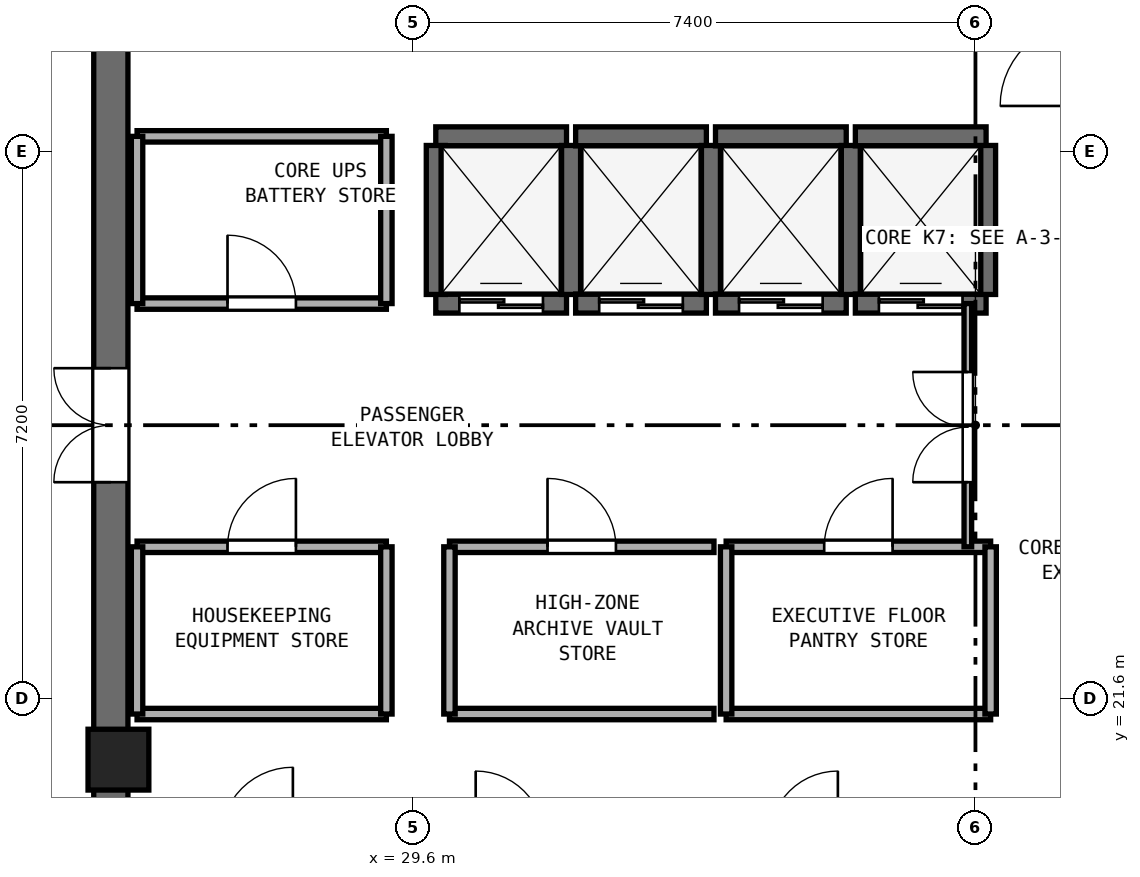
"""IFC4 building model, lengths in metres.
Left out: names, types, materials, properties, quantities, classifications, styles, units other than length and angle.
Written with IfcOpenShell. Run it as: python <this file> out.ifc"""

import sys

from ifc_helpers import new_model, si_unit, direction, frame, frame_2d, origin, origin_2d, place, context, subcontext, project, spatial, rectangle, extrude, element, fill, save


model = new_model("IFC4")
c1 = context("Model", 3, precision=1e-05, world=origin(), true_north=direction((0.0, 1.0)))
c2 = subcontext(c1, "Body", "Model", "MODEL_VIEW")
j1 = project(units=[si_unit("LENGTHUNIT", "METRE"), si_unit("PLANEANGLEUNIT", "RADIAN")], contexts=[c1])
p1 = place(None, origin())
s1 = spatial("IfcSite", under=j1, at=p1, CompositionType="ELEMENT")
p2 = place(p1, origin())
s2 = spatial("IfcBuilding", under=s1, at=p2, CompositionType="ELEMENT")
p3 = place(p2, frame((0.0, 0.0, 270.6)))
s3 = spatial("IfcBuildingStorey", under=s2, at=p3, CompositionType="ELEMENT", Elevation=270.6)
p4 = place(p3, frame((25.625, 17.45, 0.0), z_axis=(0.0, 0.0, 1.0), x_axis=(0.0, 1.0, 0.0)))
e1 = element("IfcWall", 1, at=p4, inside=s3, PredefinedType="SHEAR", context=c2, shape_type="SweptSolid", body=[
    extrude(rectangle(XDim=15.5, YDim=0.45, at=frame_2d((7.75, 0.0))), origin(), (0.0, 0.0, 1.0), 3.54),
])
p5 = place(p4, frame((7.0, 0.0, 0.0)))
e2 = element("IfcOpeningElement", 2, at=p5, cuts=e1, PredefinedType="OPENING", context=c2, shape_type="SweptSolid", body=[
    extrude(rectangle(XDim=1.5, YDim=2.15, at=frame_2d((0.75, 1.075))), frame((0.0, 0.235, 0.0), z_axis=(0.0, -1.0, 0.0), x_axis=(1.0, 0.0, 0.0)), (0.0, 0.0, 1.0), 0.47),
])
p6 = place(p3, frame((25.725, 20.8, 0.0), z_axis=(0.0, 0.0, 1.0), x_axis=(1.0, 0.0, 0.0)))
e3 = element("IfcColumn", 3, at=p6, inside=s3, PredefinedType="PILASTER", context=c2, shape_type="SweptSolid", body=[
    extrude(rectangle(XDim=0.8, YDim=0.8, at=origin_2d()), origin(), (0.0, 0.0, 1.0), 3.8),
])
p7 = place(p3, frame((29.9, 26.8, 0.0), z_axis=(0.0, 0.0, 1.0), x_axis=(1.0, 0.0, 0.0)))
e4 = element("IfcWall", 4, at=p7, inside=s3, PredefinedType="SHEAR", context=c2, shape_type="SweptSolid", body=[
    extrude(rectangle(XDim=1.72, YDim=0.25, at=frame_2d((0.86, 0.0))), origin(), (0.0, 0.0, 1.0), 3.54),
])
p8 = place(p7, frame((0.31, 0.0, 0.0)))
e5 = element("IfcOpeningElement", 5, at=p8, cuts=e4, PredefinedType="OPENING", context=c2, shape_type="SweptSolid", body=[
    extrude(rectangle(XDim=1.1, YDim=2.15, at=frame_2d((0.55, 1.075))), frame((0.0, 0.135, 0.0), z_axis=(0.0, -1.0, 0.0), x_axis=(1.0, 0.0, 0.0)), (0.0, 0.0, 1.0), 0.27),
])
p9 = place(p3, frame((29.9, 29.0, 0.0), z_axis=(0.0, 0.0, 1.0), x_axis=(1.0, 0.0, 0.0)))
e6 = element("IfcWall", 6, at=p9, inside=s3, PredefinedType="SHEAR", context=c2, shape_type="SweptSolid", body=[
    extrude(rectangle(XDim=1.72, YDim=0.25, at=frame_2d((0.86, 0.0))), origin(), (0.0, 0.0, 1.0), 3.54),
])
for number, where, z_axis, x_axis in (
    (7, (29.9, 26.92, 0.0), (0.0, 0.0, 1.0), (0.0, 1.0, 0.0)),
    (8, (31.68, 26.92, 0.0), (0.0, 0.0, 1.0), (0.0, 1.0, 0.0)),
):
    element("IfcWall", number, at=place(p3, frame(where, z_axis=z_axis, x_axis=x_axis)), inside=s3, PredefinedType="SHEAR", context=c2, shape_type="SweptSolid", body=[
        extrude(rectangle(XDim=1.96, YDim=0.25, at=frame_2d((0.98, 0.0))), origin(), (0.0, 0.0, 1.0), 3.54),
    ])
p10 = place(p3, frame((31.74, 26.8, 0.0), z_axis=(0.0, 0.0, 1.0), x_axis=(1.0, 0.0, 0.0)))
e9 = element("IfcWall", 9, at=p10, inside=s3, PredefinedType="SHEAR", context=c2, shape_type="SweptSolid", body=[
    extrude(rectangle(XDim=1.72, YDim=0.25, at=frame_2d((0.86, 0.0))), origin(), (0.0, 0.0, 1.0), 3.54),
])
p11 = place(p10, frame((0.31, 0.0, 0.0)))
e10 = element("IfcOpeningElement", 10, at=p11, cuts=e9, PredefinedType="OPENING", context=c2, shape_type="SweptSolid", body=[
    extrude(rectangle(XDim=1.1, YDim=2.15, at=frame_2d((0.55, 1.075))), frame((0.0, 0.135, 0.0), z_axis=(0.0, -1.0, 0.0), x_axis=(1.0, 0.0, 0.0)), (0.0, 0.0, 1.0), 0.27),
])
p12 = place(p3, frame((31.74, 29.0, 0.0), z_axis=(0.0, 0.0, 1.0), x_axis=(1.0, 0.0, 0.0)))
e11 = element("IfcWall", 11, at=p12, inside=s3, PredefinedType="SHEAR", context=c2, shape_type="SweptSolid", body=[
    extrude(rectangle(XDim=1.72, YDim=0.25, at=frame_2d((0.86, 0.0))), origin(), (0.0, 0.0, 1.0), 3.54),
])
p13 = place(p3, frame((33.52, 26.92, 0.0), z_axis=(0.0, 0.0, 1.0), x_axis=(0.0, 1.0, 0.0)))
e12 = element("IfcWall", 12, at=p13, inside=s3, PredefinedType="SHEAR", context=c2, shape_type="SweptSolid", body=[
    extrude(rectangle(XDim=1.96, YDim=0.25, at=frame_2d((0.98, 0.0))), origin(), (0.0, 0.0, 1.0), 3.54),
])
p14 = place(p3, frame((33.58, 26.8, 0.0), z_axis=(0.0, 0.0, 1.0), x_axis=(1.0, 0.0, 0.0)))
e13 = element("IfcWall", 13, at=p14, inside=s3, PredefinedType="SHEAR", context=c2, shape_type="SweptSolid", body=[
    extrude(rectangle(XDim=1.72, YDim=0.25, at=frame_2d((0.86, 0.0))), origin(), (0.0, 0.0, 1.0), 3.54),
])
p15 = place(p14, frame((0.31, 0.0, 0.0)))
e14 = element("IfcOpeningElement", 14, at=p15, cuts=e13, PredefinedType="OPENING", context=c2, shape_type="SweptSolid", body=[
    extrude(rectangle(XDim=1.1, YDim=2.15, at=frame_2d((0.55, 1.075))), frame((0.0, 0.135, 0.0), z_axis=(0.0, -1.0, 0.0), x_axis=(1.0, 0.0, 0.0)), (0.0, 0.0, 1.0), 0.27),
])
p16 = place(p3, frame((33.58, 29.0, 0.0), z_axis=(0.0, 0.0, 1.0), x_axis=(1.0, 0.0, 0.0)))
e15 = element("IfcWall", 15, at=p16, inside=s3, PredefinedType="SHEAR", context=c2, shape_type="SweptSolid", body=[
    extrude(rectangle(XDim=1.72, YDim=0.25, at=frame_2d((0.86, 0.0))), origin(), (0.0, 0.0, 1.0), 3.54),
])
p17 = place(p3, frame((35.36, 26.92, 0.0), z_axis=(0.0, 0.0, 1.0), x_axis=(0.0, 1.0, 0.0)))
e16 = element("IfcWall", 16, at=p17, inside=s3, PredefinedType="SHEAR", context=c2, shape_type="SweptSolid", body=[
    extrude(rectangle(XDim=1.96, YDim=0.25, at=frame_2d((0.98, 0.0))), origin(), (0.0, 0.0, 1.0), 3.54),
])
p18 = place(p3, frame((35.42, 26.8, 0.0), z_axis=(0.0, 0.0, 1.0), x_axis=(1.0, 0.0, 0.0)))
e17 = element("IfcWall", 17, at=p18, inside=s3, PredefinedType="SHEAR", context=c2, shape_type="SweptSolid", body=[
    extrude(rectangle(XDim=1.72, YDim=0.25, at=frame_2d((0.86, 0.0))), origin(), (0.0, 0.0, 1.0), 3.54),
])
p19 = place(p18, frame((0.31, 0.0, 0.0)))
e18 = element("IfcOpeningElement", 18, at=p19, cuts=e17, PredefinedType="OPENING", context=c2, shape_type="SweptSolid", body=[
    extrude(rectangle(XDim=1.1, YDim=2.15, at=frame_2d((0.55, 1.075))), frame((0.0, 0.135, 0.0), z_axis=(0.0, -1.0, 0.0), x_axis=(1.0, 0.0, 0.0)), (0.0, 0.0, 1.0), 0.27),
])
p20 = place(p3, frame((35.42, 29.0, 0.0), z_axis=(0.0, 0.0, 1.0), x_axis=(1.0, 0.0, 0.0)))
e19 = element("IfcWall", 19, at=p20, inside=s3, PredefinedType="SHEAR", context=c2, shape_type="SweptSolid", body=[
    extrude(rectangle(XDim=1.72, YDim=0.25, at=frame_2d((0.86, 0.0))), origin(), (0.0, 0.0, 1.0), 3.54),
])
p21 = place(p3, frame((37.14, 26.92, 0.0), z_axis=(0.0, 0.0, 1.0), x_axis=(0.0, 1.0, 0.0)))
e20 = element("IfcWall", 20, at=p21, inside=s3, PredefinedType="SHEAR", context=c2, shape_type="SweptSolid", body=[
    extrude(rectangle(XDim=1.96, YDim=0.25, at=frame_2d((0.98, 0.0))), origin(), (0.0, 0.0, 1.0), 3.54),
])
p22 = place(p3, frame((25.97, 26.8, 0.0), z_axis=(0.0, 0.0, 1.0), x_axis=(1.0, 0.0, 0.0)))
e21 = element("IfcWall", 21, at=p22, inside=s3, PredefinedType="PARTITIONING", context=c2, shape_type="SweptSolid", body=[
    extrude(rectangle(XDim=3.28, YDim=0.15, at=frame_2d((1.64, 0.0))), origin(), (0.0, 0.0, 1.0), 3.54),
])
p23 = place(p22, frame((1.19, 0.0, 0.0)))
e22 = element("IfcOpeningElement", 22, at=p23, cuts=e21, PredefinedType="OPENING", context=c2, shape_type="SweptSolid", body=[
    extrude(rectangle(XDim=0.9, YDim=2.1, at=frame_2d((0.45, 1.05))), frame((0.0, 0.085, 0.0), z_axis=(0.0, -1.0, 0.0), x_axis=(1.0, 0.0, 0.0)), (0.0, 0.0, 1.0), 0.17),
])
p24 = place(p3, frame((25.97, 29.0, 0.0), z_axis=(0.0, 0.0, 1.0), x_axis=(1.0, 0.0, 0.0)))
e23 = element("IfcWall", 23, at=p24, inside=s3, PredefinedType="PARTITIONING", context=c2, shape_type="SweptSolid", body=[
    extrude(rectangle(XDim=3.28, YDim=0.15, at=frame_2d((1.64, 0.0))), origin(), (0.0, 0.0, 1.0), 3.54),
])
p25 = place(p3, frame((25.97, 26.8, 0.0), z_axis=(0.0, 0.0, 1.0), x_axis=(0.0, 1.0, 0.0)))
e24 = element("IfcWall", 24, at=p25, inside=s3, PredefinedType="PARTITIONING", context=c2, shape_type="SweptSolid", body=[
    extrude(rectangle(XDim=2.2, YDim=0.15, at=frame_2d((1.1, 0.0))), origin(), (0.0, 0.0, 1.0), 2.64),
])
p26 = place(p3, frame((29.25, 26.8, 0.0), z_axis=(0.0, 0.0, 1.0), x_axis=(0.0, 1.0, 0.0)))
e25 = element("IfcWall", 25, at=p26, inside=s3, PredefinedType="PARTITIONING", context=c2, shape_type="SweptSolid", body=[
    extrude(rectangle(XDim=2.2, YDim=0.15, at=frame_2d((1.1, 0.0))), origin(), (0.0, 0.0, 1.0), 3.54),
])
p27 = place(p3, frame((25.97, 21.4, 0.0), z_axis=(0.0, 0.0, 1.0), x_axis=(1.0, 0.0, 0.0)))
e26 = element("IfcWall", 26, at=p27, inside=s3, PredefinedType="PARTITIONING", context=c2, shape_type="SweptSolid", body=[
    extrude(rectangle(XDim=3.28, YDim=0.15, at=frame_2d((1.64, 0.0))), origin(), (0.0, 0.0, 1.0), 3.54),
])
p28 = place(p3, frame((25.97, 23.6, 0.0), z_axis=(0.0, 0.0, 1.0), x_axis=(1.0, 0.0, 0.0)))
e27 = element("IfcWall", 27, at=p28, inside=s3, PredefinedType="PARTITIONING", context=c2, shape_type="SweptSolid", body=[
    extrude(rectangle(XDim=3.28, YDim=0.15, at=frame_2d((1.64, 0.0))), origin(), (0.0, 0.0, 1.0), 3.54),
])
p29 = place(p28, frame((1.19, 0.0, 0.0)))
e28 = element("IfcOpeningElement", 28, at=p29, cuts=e27, PredefinedType="OPENING", context=c2, shape_type="SweptSolid", body=[
    extrude(rectangle(XDim=0.9, YDim=2.1, at=frame_2d((0.45, 1.05))), frame((0.0, 0.085, 0.0), z_axis=(0.0, -1.0, 0.0), x_axis=(1.0, 0.0, 0.0)), (0.0, 0.0, 1.0), 0.17),
])
p30 = place(p3, frame((25.97, 21.4, 0.0), z_axis=(0.0, 0.0, 1.0), x_axis=(0.0, 1.0, 0.0)))
e29 = element("IfcWall", 29, at=p30, inside=s3, PredefinedType="PARTITIONING", context=c2, shape_type="SweptSolid", body=[
    extrude(rectangle(XDim=2.2, YDim=0.15, at=frame_2d((1.1, 0.0))), origin(), (0.0, 0.0, 1.0), 2.64),
])
p31 = place(p3, frame((29.25, 21.4, 0.0), z_axis=(0.0, 0.0, 1.0), x_axis=(0.0, 1.0, 0.0)))
e30 = element("IfcWall", 30, at=p31, inside=s3, PredefinedType="PARTITIONING", context=c2, shape_type="SweptSolid", body=[
    extrude(rectangle(XDim=2.2, YDim=0.15, at=frame_2d((1.1, 0.0))), origin(), (0.0, 0.0, 1.0), 3.54),
])
p32 = place(p3, frame((30.08, 21.4, 0.0), z_axis=(0.0, 0.0, 1.0), x_axis=(1.0, 0.0, 0.0)))
e31 = element("IfcWall", 31, at=p32, inside=s3, PredefinedType="PARTITIONING", context=c2, shape_type="SweptSolid", body=[
    extrude(rectangle(XDim=3.48, YDim=0.15, at=frame_2d((1.74, 0.0))), origin(), (0.0, 0.0, 1.0), 3.54),
])
p33 = place(p3, frame((30.08, 23.6, 0.0), z_axis=(0.0, 0.0, 1.0), x_axis=(1.0, 0.0, 0.0)))
e32 = element("IfcWall", 32, at=p33, inside=s3, PredefinedType="PARTITIONING", context=c2, shape_type="SweptSolid", body=[
    extrude(rectangle(XDim=3.48, YDim=0.15, at=frame_2d((1.74, 0.0))), origin(), (0.0, 0.0, 1.0), 3.54),
])
p34 = place(p33, frame((1.29, 0.0, 0.0)))
e33 = element("IfcOpeningElement", 33, at=p34, cuts=e32, PredefinedType="OPENING", context=c2, shape_type="SweptSolid", body=[
    extrude(rectangle(XDim=0.9, YDim=2.1, at=frame_2d((0.45, 1.05))), frame((0.0, 0.085, 0.0), z_axis=(0.0, -1.0, 0.0), x_axis=(1.0, 0.0, 0.0)), (0.0, 0.0, 1.0), 0.17),
])
p35 = place(p3, frame((30.08, 21.4, 0.0), z_axis=(0.0, 0.0, 1.0), x_axis=(0.0, 1.0, 0.0)))
e34 = element("IfcWall", 34, at=p35, inside=s3, PredefinedType="PARTITIONING", context=c2, shape_type="SweptSolid", body=[
    extrude(rectangle(XDim=2.2, YDim=0.15, at=frame_2d((1.1, 0.0))), origin(), (0.0, 0.0, 1.0), 3.54),
])
p36 = place(p3, frame((33.72, 21.4, 0.0), z_axis=(0.0, 0.0, 1.0), x_axis=(1.0, 0.0, 0.0)))
e35 = element("IfcWall", 35, at=p36, inside=s3, PredefinedType="PARTITIONING", context=c2, shape_type="SweptSolid", body=[
    extrude(rectangle(XDim=3.48, YDim=0.15, at=frame_2d((1.74, 0.0))), origin(), (0.0, 0.0, 1.0), 3.54),
])
p37 = place(p3, frame((33.72, 23.6, 0.0), z_axis=(0.0, 0.0, 1.0), x_axis=(1.0, 0.0, 0.0)))
e36 = element("IfcWall", 36, at=p37, inside=s3, PredefinedType="PARTITIONING", context=c2, shape_type="SweptSolid", body=[
    extrude(rectangle(XDim=3.48, YDim=0.15, at=frame_2d((1.74, 0.0))), origin(), (0.0, 0.0, 1.0), 3.54),
])
p38 = place(p37, frame((1.29, 0.0, 0.0)))
e37 = element("IfcOpeningElement", 37, at=p38, cuts=e36, PredefinedType="OPENING", context=c2, shape_type="SweptSolid", body=[
    extrude(rectangle(XDim=0.9, YDim=2.1, at=frame_2d((0.45, 1.05))), frame((0.0, 0.085, 0.0), z_axis=(0.0, -1.0, 0.0), x_axis=(1.0, 0.0, 0.0)), (0.0, 0.0, 1.0), 0.17),
])
for number, where, z_axis, x_axis in (
    (38, (33.72, 21.4, 0.0), (0.0, 0.0, 1.0), (0.0, 1.0, 0.0)),
    (39, (37.2, 21.4, 0.0), (0.0, 0.0, 1.0), (0.0, 1.0, 0.0)),
):
    element("IfcWall", number, at=place(p3, frame(where, z_axis=z_axis, x_axis=x_axis)), inside=s3, PredefinedType="PARTITIONING", context=c2, shape_type="SweptSolid", body=[
        extrude(rectangle(XDim=2.2, YDim=0.15, at=frame_2d((1.1, 0.0))), origin(), (0.0, 0.0, 1.0), 3.54),
    ])
p39 = place(p3, frame((36.9, 23.6, 0.0), z_axis=(0.0, 0.0, 1.0), x_axis=(0.0, 1.0, 0.0)))
e40 = element("IfcWall", 40, at=p39, inside=s3, PredefinedType="PARTITIONING", context=c2, shape_type="SweptSolid", body=[
    extrude(rectangle(XDim=3.2, YDim=0.1, at=frame_2d((1.6, 0.0))), origin(), (0.0, 0.0, 1.0), 3.54),
])
p40 = place(p39, frame((0.85, 0.0, 0.0)))
e41 = element("IfcOpeningElement", 41, at=p40, cuts=e40, PredefinedType="OPENING", context=c2, shape_type="SweptSolid", body=[
    extrude(rectangle(XDim=1.45, YDim=2.12, at=frame_2d((0.725, 1.06))), frame((0.0, 0.06, 0.0), z_axis=(0.0, -1.0, 0.0), x_axis=(1.0, 0.0, 0.0)), (0.0, 0.0, 1.0), 0.12),
])
p41 = place(p8, origin())
e42 = element("IfcDoor", 42, at=p41, inside=s3, OperationType="DOUBLE_DOOR_SLIDING", PredefinedType="DOOR", context=c2, shape_type="SweptSolid", body=[
    extrude(rectangle(XDim=1.1, YDim=2.15, at=frame_2d((0.55, 1.075))), frame((0.0, 0.025, 0.0), z_axis=(0.0, -1.0, 0.0), x_axis=(1.0, 0.0, 0.0)), (0.0, 0.0, 1.0), 0.05),
])
fill(e5, e42)
p42 = place(p11, origin())
e43 = element("IfcDoor", 43, at=p42, inside=s3, OperationType="DOUBLE_DOOR_SLIDING", PredefinedType="DOOR", context=c2, shape_type="SweptSolid", body=[
    extrude(rectangle(XDim=1.1, YDim=2.15, at=frame_2d((0.55, 1.075))), frame((0.0, 0.025, 0.0), z_axis=(0.0, -1.0, 0.0), x_axis=(1.0, 0.0, 0.0)), (0.0, 0.0, 1.0), 0.05),
])
fill(e10, e43)
p43 = place(p15, origin())
e44 = element("IfcDoor", 44, at=p43, inside=s3, OperationType="DOUBLE_DOOR_SLIDING", PredefinedType="DOOR", context=c2, shape_type="SweptSolid", body=[
    extrude(rectangle(XDim=1.1, YDim=2.15, at=frame_2d((0.55, 1.075))), frame((0.0, 0.025, 0.0), z_axis=(0.0, -1.0, 0.0), x_axis=(1.0, 0.0, 0.0)), (0.0, 0.0, 1.0), 0.05),
])
fill(e14, e44)
p44 = place(p19, origin())
e45 = element("IfcDoor", 45, at=p44, inside=s3, OperationType="DOUBLE_DOOR_SLIDING", PredefinedType="DOOR", context=c2, shape_type="SweptSolid", body=[
    extrude(rectangle(XDim=1.1, YDim=2.15, at=frame_2d((0.55, 1.075))), frame((0.0, 0.025, 0.0), z_axis=(0.0, -1.0, 0.0), x_axis=(1.0, 0.0, 0.0)), (0.0, 0.0, 1.0), 0.05),
])
fill(e18, e45)
p45 = place(p5, origin())
e46 = element("IfcDoor", 46, at=p45, inside=s3, OperationType="DOUBLE_DOOR_SINGLE_SWING", PredefinedType="DOOR", context=c2, shape_type="SweptSolid", body=[
    extrude(rectangle(XDim=1.5, YDim=2.15, at=frame_2d((0.75, 1.075))), frame((0.0, 0.025, 0.0), z_axis=(0.0, -1.0, 0.0), x_axis=(1.0, 0.0, 0.0)), (0.0, 0.0, 1.0), 0.05),
])
fill(e2, e46)
p46 = place(p23, origin())
e47 = element("IfcDoor", 47, at=p46, inside=s3, OperationType="SINGLE_SWING_LEFT", PredefinedType="DOOR", context=c2, shape_type="SweptSolid", body=[
    extrude(rectangle(XDim=0.9, YDim=2.1, at=frame_2d((0.45, 1.05))), frame((0.0, 0.025, 0.0), z_axis=(0.0, -1.0, 0.0), x_axis=(1.0, 0.0, 0.0)), (0.0, 0.0, 1.0), 0.05),
])
fill(e22, e47)
p47 = place(p29, origin())
e48 = element("IfcDoor", 48, at=p47, inside=s3, OperationType="SINGLE_SWING_RIGHT", PredefinedType="DOOR", context=c2, shape_type="SweptSolid", body=[
    extrude(rectangle(XDim=0.9, YDim=2.1, at=frame_2d((0.45, 1.05))), frame((0.0, 0.025, 0.0), z_axis=(0.0, -1.0, 0.0), x_axis=(1.0, 0.0, 0.0)), (0.0, 0.0, 1.0), 0.05),
])
fill(e28, e48)
p48 = place(p34, origin())
e49 = element("IfcDoor", 49, at=p48, inside=s3, OperationType="SINGLE_SWING_LEFT", PredefinedType="DOOR", context=c2, shape_type="SweptSolid", body=[
    extrude(rectangle(XDim=0.9, YDim=2.1, at=frame_2d((0.45, 1.05))), frame((0.0, 0.025, 0.0), z_axis=(0.0, -1.0, 0.0), x_axis=(1.0, 0.0, 0.0)), (0.0, 0.0, 1.0), 0.05),
])
fill(e33, e49)
p49 = place(p38, origin())
e50 = element("IfcDoor", 50, at=p49, inside=s3, OperationType="SINGLE_SWING_RIGHT", PredefinedType="DOOR", context=c2, shape_type="SweptSolid", body=[
    extrude(rectangle(XDim=0.9, YDim=2.1, at=frame_2d((0.45, 1.05))), frame((0.0, 0.025, 0.0), z_axis=(0.0, -1.0, 0.0), x_axis=(1.0, 0.0, 0.0)), (0.0, 0.0, 1.0), 0.05),
])
fill(e37, e50)
p50 = place(p40, origin())
e51 = element("IfcDoor", 51, at=p50, inside=s3, OperationType="DOUBLE_DOOR_SINGLE_SWING", PredefinedType="DOOR", context=c2, shape_type="SweptSolid", body=[
    extrude(rectangle(XDim=1.45, YDim=2.12, at=frame_2d((0.725, 1.06))), frame((0.0, 0.025, 0.0), z_axis=(0.0, -1.0, 0.0), x_axis=(1.0, 0.0, 0.0)), (0.0, 0.0, 1.0), 0.05),
])
fill(e41, e51)
save(model, sys.argv[1])
